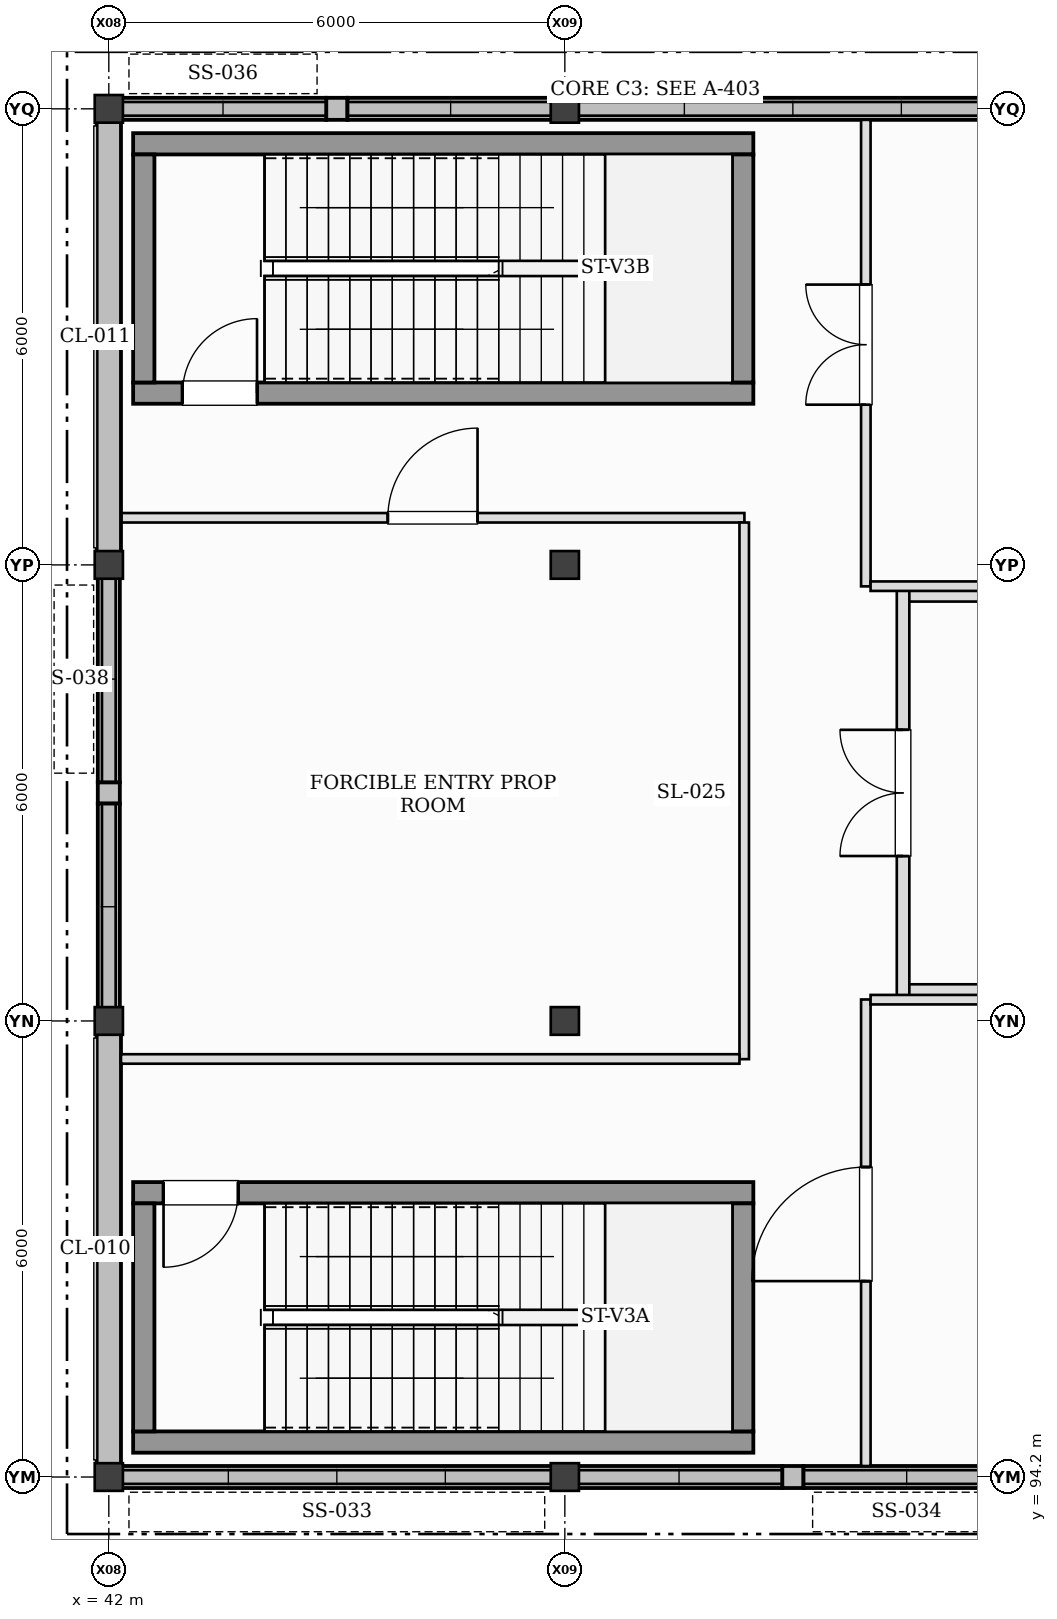
"""IFC4 building model, lengths in metres.
Left out: names, types, materials, properties, quantities, classifications, styles, units other than length and angle.
Written with IfcOpenShell. Run it as: python <this file> out.ifc"""

import sys

from ifc_helpers import new_model, si_unit, direction, frame, frame_2d, origin, origin_2d, place, context, subcontext, project, spatial, rectangle, i_section, extrude, element, fill, save


model = new_model("IFC4")
c1 = context("Model", 3, precision=1e-05, world=origin(), true_north=direction((0.0, 1.0)))
c2 = subcontext(c1, "Body", "Model", "MODEL_VIEW")
j1 = project(units=[si_unit("LENGTHUNIT", "METRE"), si_unit("PLANEANGLEUNIT", "RADIAN")], contexts=[c1])
p1 = place(None, origin())
s1 = spatial("IfcSite", under=j1, at=p1, CompositionType="ELEMENT")
p2 = place(p1, origin())
s2 = spatial("IfcBuilding", under=s1, at=p2, CompositionType="ELEMENT")
p3 = place(p2, frame((0.0, 0.0, 6.0)))
s3 = spatial("IfcBuildingStorey", under=s2, at=p3, CompositionType="ELEMENT", Elevation=6.0)
for number, where, z_axis, x_axis in (
    (1, (42.0, 94.2, 0.0), (0.0, 0.0, 1.0), (1.0, 0.0, 0.0)),
    (2, (42.0, 100.2, 0.0), (0.0, 0.0, 1.0), (1.0, 0.0, 0.0)),
    (3, (42.0, 106.2, 0.0), (0.0, 0.0, 1.0), (1.0, 0.0, 0.0)),
    (4, (42.0, 112.2, 0.0), (0.0, 0.0, 1.0), (1.0, 0.0, 0.0)),
    (5, (48.0, 94.2, 0.0), (0.0, 0.0, 1.0), (1.0, 0.0, 0.0)),
    (6, (48.0, 100.2, 0.0), (0.0, 0.0, 1.0), (1.0, 0.0, 0.0)),
    (7, (48.0, 106.2, 0.0), (0.0, 0.0, 1.0), (1.0, 0.0, 0.0)),
    (8, (48.0, 112.2, 0.0), (0.0, 0.0, 1.0), (1.0, 0.0, 0.0)),
):
    element("IfcColumn", number, at=place(p3, frame(where, z_axis=z_axis, x_axis=x_axis)), inside=s3, PredefinedType="COLUMN", context=c2, shape_type="SweptSolid", body=[
        extrude(i_section(OverallWidth=0.371, OverallDepth=0.364, WebThickness=0.013, FlangeThickness=0.022, at=origin_2d()), origin(), (0.0, 0.0, 1.0), 4.0),
    ])
p4 = place(p3, frame((42.145, 94.2, 0.0), z_axis=(0.0, 0.0, 1.0), x_axis=(1.0, 0.0, 0.0)))
e9 = element("IfcWall", 9, at=p4, inside=s3, PredefinedType="STANDARD", context=c2, shape_type="SweptSolid", body=[
    extrude(rectangle(XDim=5.71, YDim=0.29, at=frame_2d((2.855, 0.0))), origin(), (0.0, 0.0, 1.0), 0.8),
])
p5 = place(p3, frame((50.86, 94.2, 0.0), z_axis=(0.0, 0.0, 1.0), x_axis=(1.0, 0.0, 0.0)))
e10 = element("IfcWall", 10, at=p5, inside=s3, PredefinedType="STANDARD", context=c2, shape_type="SweptSolid", body=[
    extrude(rectangle(XDim=0.28, YDim=0.29, at=frame_2d((0.14, 0.0))), origin(), (0.0, 0.0, 1.0), 3.153),
])
p6 = place(p3, frame((48.145, 94.2, 0.0), z_axis=(0.0, 0.0, 1.0), x_axis=(1.0, 0.0, 0.0)))
e11 = element("IfcWall", 11, at=p6, inside=s3, PredefinedType="STANDARD", context=c2, shape_type="SweptSolid", body=[
    extrude(rectangle(XDim=2.715, YDim=0.29, at=frame_2d((1.357, 0.0))), origin(), (0.0, 0.0, 1.0), 0.92),
])
p7 = place(p3, frame((51.14, 94.2, 0.0), z_axis=(0.0, 0.0, 1.0), x_axis=(1.0, 0.0, 0.0)))
e12 = element("IfcWall", 12, at=p7, inside=s3, PredefinedType="STANDARD", context=c2, shape_type="SweptSolid", body=[
    extrude(rectangle(XDim=2.715, YDim=0.29, at=frame_2d((1.357, 0.0))), origin(), (0.0, 0.0, 1.0), 0.32),
])
p8 = place(p3, frame((45.14, 112.2, 0.0), z_axis=(0.0, 0.0, 1.0), x_axis=(-1.0, 0.0, 0.0)))
e13 = element("IfcWall", 13, at=p8, inside=s3, PredefinedType="STANDARD", context=c2, shape_type="SweptSolid", body=[
    extrude(rectangle(XDim=0.28, YDim=0.29, at=frame_2d((0.14, 0.0))), origin(), (0.0, 0.0, 1.0), 3.153),
])
p9 = place(p3, frame((47.855, 112.2, 0.0), z_axis=(0.0, 0.0, 1.0), x_axis=(-1.0, 0.0, 0.0)))
e14 = element("IfcWall", 14, at=p9, inside=s3, PredefinedType="STANDARD", context=c2, shape_type="SweptSolid", body=[
    extrude(rectangle(XDim=2.715, YDim=0.29, at=frame_2d((1.357, 0.0))), origin(), (0.0, 0.0, 1.0), 0.44),
])
p10 = place(p3, frame((44.86, 112.2, 0.0), z_axis=(0.0, 0.0, 1.0), x_axis=(-1.0, 0.0, 0.0)))
e15 = element("IfcWall", 15, at=p10, inside=s3, PredefinedType="STANDARD", context=c2, shape_type="SweptSolid", body=[
    extrude(rectangle(XDim=2.715, YDim=0.29, at=frame_2d((1.357, 0.0))), origin(), (0.0, 0.0, 1.0), 0.56),
])
p11 = place(p3, frame((53.855, 112.2, 0.0), z_axis=(0.0, 0.0, 1.0), x_axis=(-1.0, 0.0, 0.0)))
e16 = element("IfcWall", 16, at=p11, inside=s3, PredefinedType="STANDARD", context=c2, shape_type="SweptSolid", body=[
    extrude(rectangle(XDim=5.71, YDim=0.29, at=frame_2d((2.855, 0.0))), origin(), (0.0, 0.0, 1.0), 0.68),
])
p12 = place(p3, frame((42.0, 100.055, 0.0), z_axis=(0.0, 0.0, 1.0), x_axis=(0.0, -1.0, 0.0)))
e17 = element("IfcWall", 17, at=p12, inside=s3, PredefinedType="STANDARD", context=c2, shape_type="SweptSolid", body=[
    extrude(rectangle(XDim=5.71, YDim=0.32, at=frame_2d((2.855, 0.0))), origin(), (0.0, 0.0, 1.0), 3.157),
])
p13 = place(p3, frame((42.0, 103.34, 0.0), z_axis=(0.0, 0.0, 1.0), x_axis=(0.0, -1.0, 0.0)))
e18 = element("IfcWall", 18, at=p13, inside=s3, PredefinedType="STANDARD", context=c2, shape_type="SweptSolid", body=[
    extrude(rectangle(XDim=0.28, YDim=0.29, at=frame_2d((0.14, 0.0))), origin(), (0.0, 0.0, 1.0), 3.157),
])
p14 = place(p3, frame((42.0, 106.055, 0.0), z_axis=(0.0, 0.0, 1.0), x_axis=(0.0, -1.0, 0.0)))
e19 = element("IfcWall", 19, at=p14, inside=s3, PredefinedType="STANDARD", context=c2, shape_type="SweptSolid", body=[
    extrude(rectangle(XDim=2.715, YDim=0.29, at=frame_2d((1.357, 0.0))), origin(), (0.0, 0.0, 1.0), 0.8),
])
p15 = place(p3, frame((42.0, 103.06, 0.0), z_axis=(0.0, 0.0, 1.0), x_axis=(0.0, -1.0, 0.0)))
e20 = element("IfcWall", 20, at=p15, inside=s3, PredefinedType="STANDARD", context=c2, shape_type="SweptSolid", body=[
    extrude(rectangle(XDim=2.715, YDim=0.29, at=frame_2d((1.357, 0.0))), origin(), (0.0, 0.0, 1.0), 0.92),
])
p16 = place(p3, frame((42.0, 112.055, 0.0), z_axis=(0.0, 0.0, 1.0), x_axis=(0.0, -1.0, 0.0)))
e21 = element("IfcWall", 21, at=p16, inside=s3, PredefinedType="STANDARD", context=c2, shape_type="SweptSolid", body=[
    extrude(rectangle(XDim=5.71, YDim=0.32, at=frame_2d((2.855, 0.0))), origin(), (0.0, 0.0, 1.0), 3.157),
])
p17 = place(p3, frame((42.32, 94.66, 0.0), z_axis=(0.0, 0.0, 1.0), x_axis=(1.0, 0.0, 0.0)))
e22 = element("IfcWall", 22, at=p17, inside=s3, PredefinedType="SHEAR", context=c2, shape_type="SweptSolid", body=[
    extrude(rectangle(XDim=8.16, YDim=0.28, at=frame_2d((4.08, 0.0))), origin(), (0.0, 0.0, 1.0), 4.0),
])
p18 = place(p3, frame((50.48, 97.94, 0.0), z_axis=(0.0, 0.0, 1.0), x_axis=(-1.0, 0.0, 0.0)))
e23 = element("IfcWall", 23, at=p18, inside=s3, PredefinedType="SHEAR", context=c2, shape_type="SweptSolid", body=[
    extrude(rectangle(XDim=8.16, YDim=0.28, at=frame_2d((4.08, 0.0))), origin(), (0.0, 0.0, 1.0), 4.0),
])
p19 = place(p18, frame((6.78, 0.0, 0.0)))
e24 = element("IfcOpeningElement", 24, at=p19, cuts=e23, PredefinedType="OPENING", context=c2, shape_type="SweptSolid", body=[
    extrude(rectangle(XDim=0.98, YDim=2.15, at=frame_2d((0.49, 1.075))), frame((0.0, 0.15, 0.0), z_axis=(0.0, -1.0, 0.0), x_axis=(1.0, 0.0, 0.0)), (0.0, 0.0, 1.0), 0.3),
])
for number, where, z_axis, x_axis in (
    (25, (42.46, 97.8, 0.0), (0.0, 0.0, 1.0), (0.0, -1.0, 0.0)),
    (26, (50.34, 94.8, 0.0), (0.0, 0.0, 1.0), (0.0, 1.0, 0.0)),
):
    element("IfcWall", number, at=place(p3, frame(where, z_axis=z_axis, x_axis=x_axis)), inside=s3, PredefinedType="SHEAR", context=c2, shape_type="SweptSolid", body=[
        extrude(rectangle(XDim=3.0, YDim=0.28, at=frame_2d((1.5, 0.0))), origin(), (0.0, 0.0, 1.0), 4.0),
    ])
p20 = place(p3, frame((42.32, 108.46, 0.0), z_axis=(0.0, 0.0, 1.0), x_axis=(1.0, 0.0, 0.0)))
e27 = element("IfcWall", 27, at=p20, inside=s3, PredefinedType="SHEAR", context=c2, shape_type="SweptSolid", body=[
    extrude(rectangle(XDim=8.16, YDim=0.28, at=frame_2d((4.08, 0.0))), origin(), (0.0, 0.0, 1.0), 4.0),
])
p21 = place(p20, frame((0.65, 0.0, 0.0)))
e28 = element("IfcOpeningElement", 28, at=p21, cuts=e27, PredefinedType="OPENING", context=c2, shape_type="SweptSolid", body=[
    extrude(rectangle(XDim=0.98, YDim=2.15, at=frame_2d((0.49, 1.075))), frame((0.0, 0.15, 0.0), z_axis=(0.0, -1.0, 0.0), x_axis=(1.0, 0.0, 0.0)), (0.0, 0.0, 1.0), 0.3),
])
p22 = place(p3, frame((50.48, 111.74, 0.0), z_axis=(0.0, 0.0, 1.0), x_axis=(-1.0, 0.0, 0.0)))
e29 = element("IfcWall", 29, at=p22, inside=s3, PredefinedType="SHEAR", context=c2, shape_type="SweptSolid", body=[
    extrude(rectangle(XDim=8.16, YDim=0.28, at=frame_2d((4.08, 0.0))), origin(), (0.0, 0.0, 1.0), 4.0),
])
for number, where, z_axis, x_axis in (
    (30, (42.46, 111.6, 0.0), (0.0, 0.0, 1.0), (0.0, -1.0, 0.0)),
    (31, (50.34, 108.6, 0.0), (0.0, 0.0, 1.0), (0.0, 1.0, 0.0)),
):
    element("IfcWall", number, at=place(p3, frame(where, z_axis=z_axis, x_axis=x_axis)), inside=s3, PredefinedType="SHEAR", context=c2, shape_type="SweptSolid", body=[
        extrude(rectangle(XDim=3.0, YDim=0.28, at=frame_2d((1.5, 0.0))), origin(), (0.0, 0.0, 1.0), 4.0),
    ])
for number, where, z_axis, x_axis in (
    (32, (52.45, 100.6, 0.0), (0.0, 0.0, 1.0), (1.0, 0.0, 0.0)),
    (33, (56.448, 105.8, 0.0), (0.0, 0.0, 1.0), (-1.0, 0.0, 0.0)),
):
    element("IfcWall", number, at=place(p3, frame(where, z_axis=z_axis, x_axis=x_axis)), inside=s3, PredefinedType="PARTITIONING", context=c2, shape_type="SweptSolid", body=[
        extrude(rectangle(XDim=3.998, YDim=0.165, at=frame_2d((1.999, 0.0))), origin(), (0.0, 0.0, 1.0), 3.72),
    ])
p23 = place(p3, frame((52.45, 100.52, 0.0), z_axis=(0.0, 0.0, 1.0), x_axis=(0.0, 1.0, 0.0)))
e34 = element("IfcWall", 34, at=p23, inside=s3, PredefinedType="PARTITIONING", context=c2, shape_type="SweptSolid", body=[
    extrude(rectangle(XDim=5.36, YDim=0.165, at=frame_2d((2.68, 0.0))), origin(), (0.0, 0.0, 1.0), 3.72),
])
p24 = place(p23, frame((1.85, 0.0, 0.0)))
e35 = element("IfcOpeningElement", 35, at=p24, cuts=e34, PredefinedType="OPENING", context=c2, shape_type="SweptSolid", body=[
    extrude(rectangle(XDim=1.66, YDim=2.2, at=frame_2d((0.83, 1.1))), frame((0.0, 0.093, 0.0), z_axis=(0.0, -1.0, 0.0), x_axis=(1.0, 0.0, 0.0)), (0.0, 0.0, 1.0), 0.185),
])
p25 = place(p3, frame((42.16, 106.82, 0.0), z_axis=(0.0, 0.0, 1.0), x_axis=(1.0, 0.0, 0.0)))
e36 = element("IfcWall", 36, at=p25, inside=s3, PredefinedType="PARTITIONING", context=c2, shape_type="SweptSolid", body=[
    extrude(rectangle(XDim=8.203, YDim=0.125, at=frame_2d((4.101, 0.0))), origin(), (0.0, 0.0, 1.0), 3.72),
])
p26 = place(p25, frame((3.511, 0.0, 0.0)))
e37 = element("IfcOpeningElement", 37, at=p26, cuts=e36, PredefinedType="OPENING", context=c2, shape_type="SweptSolid", body=[
    extrude(rectangle(XDim=1.18, YDim=2.16, at=frame_2d((0.59, 1.08))), frame((0.0, 0.073, 0.0), z_axis=(0.0, -1.0, 0.0), x_axis=(1.0, 0.0, 0.0)), (0.0, 0.0, 1.0), 0.145),
])
p27 = place(p3, frame((50.36, 106.758, 0.0), z_axis=(0.0, 0.0, 1.0), x_axis=(0.0, -1.0, 0.0)))
e38 = element("IfcWall", 38, at=p27, inside=s3, PredefinedType="PARTITIONING", context=c2, shape_type="SweptSolid", body=[
    extrude(rectangle(XDim=7.06, YDim=0.125, at=frame_2d((3.53, 0.0))), origin(), (0.0, 0.0, 1.0), 3.72),
])
p28 = place(p3, frame((50.298, 99.7, 0.0), z_axis=(0.0, 0.0, 1.0), x_axis=(-1.0, 0.0, 0.0)))
e39 = element("IfcWall", 39, at=p28, inside=s3, PredefinedType="PARTITIONING", context=c2, shape_type="SweptSolid", body=[
    extrude(rectangle(XDim=8.138, YDim=0.125, at=frame_2d((4.069, 0.0))), origin(), (0.0, 0.0, 1.0), 3.72),
])
p29 = place(p3, frame((51.96, 94.345, 0.0), z_axis=(0.0, 0.0, 1.0), x_axis=(0.0, 1.0, 0.0)))
e40 = element("IfcWall", 40, at=p29, inside=s3, PredefinedType="PARTITIONING", context=c2, shape_type="SweptSolid", body=[
    extrude(rectangle(XDim=6.137, YDim=0.125, at=frame_2d((3.069, 0.0))), origin(), (0.0, 0.0, 1.0), 3.43),
])
p30 = place(p29, frame((2.432, 0.0, 0.0)))
e41 = element("IfcOpeningElement", 41, at=p30, cuts=e40, PredefinedType="OPENING", context=c2, shape_type="SweptSolid", body=[
    extrude(rectangle(XDim=1.5, YDim=2.22, at=frame_2d((0.75, 1.11))), frame((0.0, 0.073, 0.0), z_axis=(0.0, -1.0, 0.0), x_axis=(1.0, 0.0, 0.0)), (0.0, 0.0, 1.0), 0.145),
])
p31 = place(p3, frame((52.022, 100.48, 0.0), z_axis=(0.0, 0.0, 1.0), x_axis=(1.0, 0.0, 0.0)))
e42 = element("IfcWall", 42, at=p31, inside=s3, PredefinedType="PARTITIONING", context=c2, shape_type="SweptSolid", body=[
    extrude(rectangle(XDim=7.833, YDim=0.125, at=frame_2d((3.916, 0.0))), origin(), (0.0, 0.0, 1.0), 3.153),
])
p32 = place(p3, frame((51.96, 105.917, 0.0), z_axis=(0.0, 0.0, 1.0), x_axis=(0.0, 1.0, 0.0)))
e43 = element("IfcWall", 43, at=p32, inside=s3, PredefinedType="PARTITIONING", context=c2, shape_type="SweptSolid", body=[
    extrude(rectangle(XDim=6.137, YDim=0.125, at=frame_2d((3.069, 0.0))), origin(), (0.0, 0.0, 1.0), 3.43),
])
p33 = place(p32, frame((2.39, 0.0, 0.0)))
e44 = element("IfcOpeningElement", 44, at=p33, cuts=e43, PredefinedType="OPENING", context=c2, shape_type="SweptSolid", body=[
    extrude(rectangle(XDim=1.58, YDim=2.2, at=frame_2d((0.79, 1.1))), frame((0.0, 0.073, 0.0), z_axis=(0.0, -1.0, 0.0), x_axis=(1.0, 0.0, 0.0)), (0.0, 0.0, 1.0), 0.145),
])
p34 = place(p3, frame((59.855, 105.92, 0.0), z_axis=(0.0, 0.0, 1.0), x_axis=(-1.0, 0.0, 0.0)))
e45 = element("IfcWall", 45, at=p34, inside=s3, PredefinedType="PARTITIONING", context=c2, shape_type="SweptSolid", body=[
    extrude(rectangle(XDim=7.833, YDim=0.125, at=frame_2d((3.916, 0.0))), origin(), (0.0, 0.0, 1.0), 3.153),
])
p35 = place(p19, origin())
e46 = element("IfcDoor", 46, at=p35, inside=s3, OperationType="SINGLE_SWING_RIGHT", PredefinedType="DOOR", context=c2, shape_type="SweptSolid", body=[
    extrude(rectangle(XDim=0.98, YDim=2.15, at=frame_2d((0.49, 1.075))), frame((0.0, 0.025, 0.0), z_axis=(0.0, -1.0, 0.0), x_axis=(1.0, 0.0, 0.0)), (0.0, 0.0, 1.0), 0.05),
])
fill(e24, e46)
p36 = place(p21, origin())
e47 = element("IfcDoor", 47, at=p36, inside=s3, OperationType="SINGLE_SWING_RIGHT", PredefinedType="DOOR", context=c2, shape_type="SweptSolid", body=[
    extrude(rectangle(XDim=0.98, YDim=2.15, at=frame_2d((0.49, 1.075))), frame((0.0, 0.025, 0.0), z_axis=(0.0, -1.0, 0.0), x_axis=(1.0, 0.0, 0.0)), (0.0, 0.0, 1.0), 0.05),
])
fill(e28, e47)
p37 = place(p24, frame((1.66, 0.0, 0.0), z_axis=(0.0, 0.0, 1.0), x_axis=(-1.0, 0.0, 0.0)))
e48 = element("IfcDoor", 48, at=p37, inside=s3, OperationType="DOUBLE_DOOR_SINGLE_SWING", PredefinedType="DOOR", context=c2, shape_type="SweptSolid", body=[
    extrude(rectangle(XDim=1.66, YDim=2.2, at=frame_2d((0.83, 1.1))), frame((0.0, 0.025, 0.0), z_axis=(0.0, -1.0, 0.0), x_axis=(1.0, 0.0, 0.0)), (0.0, 0.0, 1.0), 0.05),
])
fill(e35, e48)
p38 = place(p26, frame((1.18, 0.0, 0.0), z_axis=(0.0, 0.0, 1.0), x_axis=(-1.0, 0.0, 0.0)))
e49 = element("IfcDoor", 49, at=p38, inside=s3, OperationType="SINGLE_SWING_RIGHT", PredefinedType="DOOR", context=c2, shape_type="SweptSolid", body=[
    extrude(rectangle(XDim=1.18, YDim=2.16, at=frame_2d((0.59, 1.08))), frame((0.0, 0.025, 0.0), z_axis=(0.0, -1.0, 0.0), x_axis=(1.0, 0.0, 0.0)), (0.0, 0.0, 1.0), 0.05),
])
fill(e37, e49)
p39 = place(p30, frame((1.5, 0.0, 0.0), z_axis=(0.0, 0.0, 1.0), x_axis=(-1.0, 0.0, 0.0)))
e50 = element("IfcDoor", 50, at=p39, inside=s3, OperationType="SINGLE_SWING_LEFT", PredefinedType="DOOR", context=c2, shape_type="SweptSolid", body=[
    extrude(rectangle(XDim=1.5, YDim=2.22, at=frame_2d((0.75, 1.11))), frame((0.0, 0.025, 0.0), z_axis=(0.0, -1.0, 0.0), x_axis=(1.0, 0.0, 0.0)), (0.0, 0.0, 1.0), 0.05),
])
fill(e41, e50)
p40 = place(p33, frame((1.58, 0.0, 0.0), z_axis=(0.0, 0.0, 1.0), x_axis=(-1.0, 0.0, 0.0)))
e51 = element("IfcDoor", 51, at=p40, inside=s3, OperationType="DOUBLE_DOOR_SINGLE_SWING", PredefinedType="DOOR", context=c2, shape_type="SweptSolid", body=[
    extrude(rectangle(XDim=1.58, YDim=2.2, at=frame_2d((0.79, 1.1))), frame((0.0, 0.025, 0.0), z_axis=(0.0, -1.0, 0.0), x_axis=(1.0, 0.0, 0.0)), (0.0, 0.0, 1.0), 0.05),
])
fill(e44, e51)
save(model, sys.argv[1])
